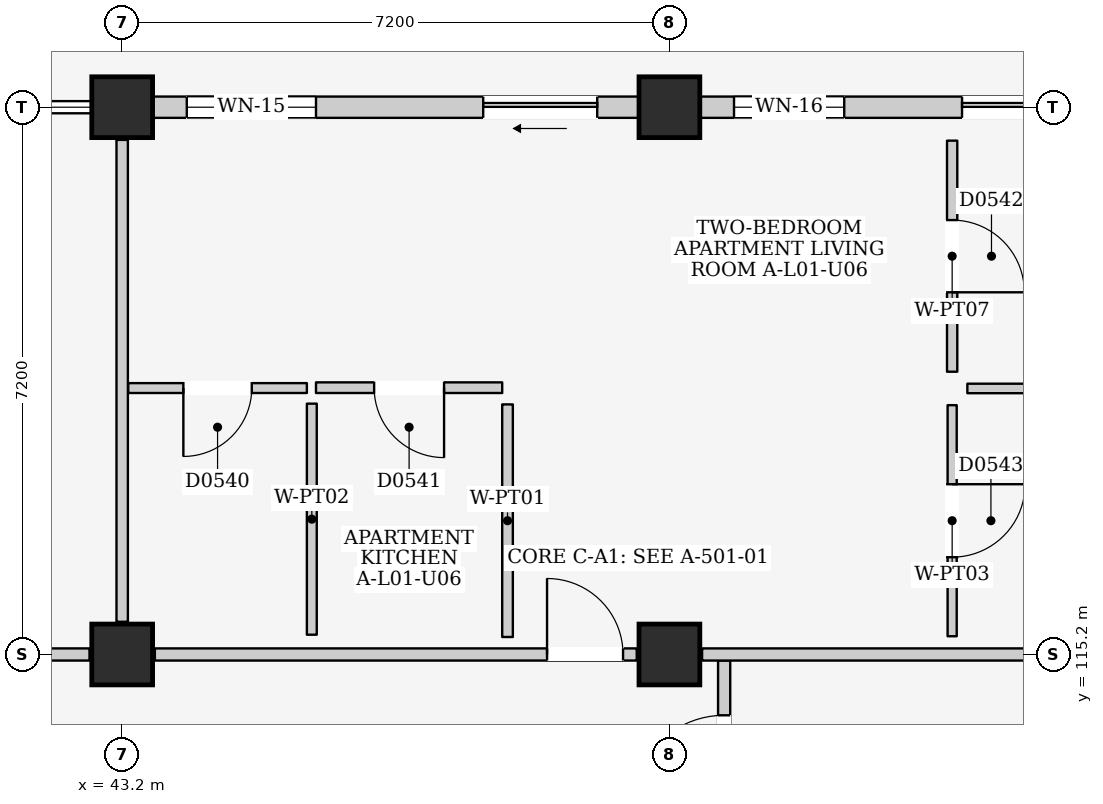
"""IFC4 building model, lengths in metres.
Left out: names, types, materials, properties, quantities, classifications, styles, units other than length and angle.
Written with IfcOpenShell. Run it as: python <this file> out.ifc"""

import sys

from ifc_helpers import new_model, si_unit, direction, frame, frame_2d, origin, origin_2d, place, context, subcontext, project, spatial, rectangle, extrude, element, fill, save


model = new_model("IFC4")
c1 = context("Model", 3, precision=1e-05, world=origin(), true_north=direction((0.0, 1.0)))
c2 = subcontext(c1, "Body", "Model", "MODEL_VIEW")
j1 = project(units=[si_unit("LENGTHUNIT", "METRE"), si_unit("PLANEANGLEUNIT", "RADIAN")], contexts=[c1])
p1 = place(None, origin())
s1 = spatial("IfcSite", under=j1, at=p1, CompositionType="ELEMENT")
p2 = place(p1, origin())
s2 = spatial("IfcBuilding", under=s1, at=p2, CompositionType="ELEMENT")
p3 = place(p2, frame((0.0, 0.0, 4.5)))
s3 = spatial("IfcBuildingStorey", under=s2, at=p3, CompositionType="ELEMENT", Elevation=4.5)
for number, where, z_axis, x_axis in (
    (1, (43.2, 115.2, 0.0), (0.0, 0.0, 1.0), (1.0, 0.0, 0.0)),
    (2, (43.2, 122.4, 0.0), (0.0, 0.0, 1.0), (1.0, 0.0, 0.0)),
    (3, (50.4, 115.2, 0.0), (0.0, 0.0, 1.0), (1.0, 0.0, 0.0)),
    (4, (50.4, 122.4, 0.0), (0.0, 0.0, 1.0), (1.0, 0.0, 0.0)),
):
    element("IfcColumn", number, at=place(p3, frame(where, z_axis=z_axis, x_axis=x_axis)), inside=s3, PredefinedType="COLUMN", context=c2, shape_type="SweptSolid", body=[
        extrude(rectangle(XDim=0.8, YDim=0.8, at=origin_2d()), origin(), (0.0, 0.0, 1.0), 4.5),
    ])
p4 = place(p3, frame((43.6, 122.4, 0.0), z_axis=(0.0, 0.0, 1.0), x_axis=(1.0, 0.0, 0.0)))
e5 = element("IfcWall", 5, at=p4, inside=s3, PredefinedType="ELEMENTEDWALL", context=c2, shape_type="SweptSolid", body=[
    extrude(rectangle(XDim=6.4, YDim=0.28, at=frame_2d((3.2, 0.0))), origin(), (0.0, 0.0, 1.0), 3.715),
])
p5 = place(p4, frame((4.35, 0.0, 0.0)))
e6 = element("IfcOpeningElement", 6, at=p5, cuts=e5, PredefinedType="OPENING", context=c2, shape_type="SweptSolid", body=[
    extrude(rectangle(XDim=1.5, YDim=2.12, at=frame_2d((0.75, 1.06))), frame((0.0, 0.155, 0.0), z_axis=(0.0, -1.0, 0.0), x_axis=(1.0, 0.0, 0.0)), (0.0, 0.0, 1.0), 0.31),
])
p6 = place(p4, frame((0.45, 0.0, 0.9)))
e7 = element("IfcOpeningElement", 7, at=p6, cuts=e5, PredefinedType="OPENING", context=c2, shape_type="SweptSolid", body=[
    extrude(rectangle(XDim=1.7, YDim=1.45, at=frame_2d((0.85, 0.725))), frame((0.0, 0.155, 0.0), z_axis=(0.0, -1.0, 0.0), x_axis=(1.0, 0.0, 0.0)), (0.0, 0.0, 1.0), 0.31),
])
p7 = place(p3, frame((50.8, 122.4, 0.0), z_axis=(0.0, 0.0, 1.0), x_axis=(1.0, 0.0, 0.0)))
e8 = element("IfcWall", 8, at=p7, inside=s3, PredefinedType="ELEMENTEDWALL", context=c2, shape_type="SweptSolid", body=[
    extrude(rectangle(XDim=6.4, YDim=0.28, at=frame_2d((3.2, 0.0))), origin(), (0.0, 0.0, 1.0), 3.715),
])
p8 = place(p7, frame((3.45, 0.0, 0.0)))
e9 = element("IfcOpeningElement", 9, at=p8, cuts=e8, PredefinedType="OPENING", context=c2, shape_type="SweptSolid", body=[
    extrude(rectangle(XDim=2.4, YDim=2.12, at=frame_2d((1.2, 1.06))), frame((0.0, 0.155, 0.0), z_axis=(0.0, -1.0, 0.0), x_axis=(1.0, 0.0, 0.0)), (0.0, 0.0, 1.0), 0.31),
])
p9 = place(p7, frame((0.45, 0.0, 0.9)))
e10 = element("IfcOpeningElement", 10, at=p9, cuts=e8, PredefinedType="OPENING", context=c2, shape_type="SweptSolid", body=[
    extrude(rectangle(XDim=1.45, YDim=1.4, at=frame_2d((0.725, 0.7))), frame((0.0, 0.155, 0.0), z_axis=(0.0, -1.0, 0.0), x_axis=(1.0, 0.0, 0.0)), (0.0, 0.0, 1.0), 0.31),
])
p10 = place(p3, frame((51.12, 111.1, 0.0), z_axis=(0.0, 0.0, 1.0), x_axis=(0.0, 1.0, 0.0)))
e11 = element("IfcWall", 11, at=p10, inside=s3, PredefinedType="PARTITIONING", context=c2, shape_type="SweptSolid", body=[
    extrude(rectangle(XDim=4.02, YDim=0.16, at=frame_2d((2.01, 0.0))), origin(), (0.0, 0.0, 1.0), 4.25),
])
p11 = place(p10, frame((2.1, 0.0, 0.0)))
e12 = element("IfcOpeningElement", 12, at=p11, cuts=e11, PredefinedType="OPENING", context=c2, shape_type="SweptSolid", body=[
    extrude(rectangle(XDim=1.2, YDim=2.2, at=frame_2d((0.6, 1.1))), frame((0.0, 0.095, 0.0), z_axis=(0.0, -1.0, 0.0), x_axis=(1.0, 0.0, 0.0)), (0.0, 0.0, 1.0), 0.19),
])
p12 = place(p3, frame((36.43, 115.2, 0.0), z_axis=(0.0, 0.0, 1.0), x_axis=(1.0, 0.0, 0.0)))
e13 = element("IfcWall", 13, at=p12, inside=s3, PredefinedType="PARTITIONING", context=c2, shape_type="SweptSolid", body=[
    extrude(rectangle(XDim=6.34, YDim=0.16, at=frame_2d((3.17, 0.0))), origin(), (0.0, 0.0, 1.0), 3.585),
])
p13 = place(p12, frame((2.67, 0.0, 0.0)))
e14 = element("IfcOpeningElement", 14, at=p13, cuts=e13, PredefinedType="OPENING", context=c2, shape_type="SweptSolid", body=[
    extrude(rectangle(XDim=1.0, YDim=2.15, at=frame_2d((0.5, 1.075))), frame((0.0, 0.095, 0.0), z_axis=(0.0, -1.0, 0.0), x_axis=(1.0, 0.0, 0.0)), (0.0, 0.0, 1.0), 0.19),
])
p14 = place(p3, frame((43.2, 115.63, 0.0), z_axis=(0.0, 0.0, 1.0), x_axis=(0.0, 1.0, 0.0)))
e15 = element("IfcWall", 15, at=p14, inside=s3, PredefinedType="PARTITIONING", context=c2, shape_type="SweptSolid", body=[
    extrude(rectangle(XDim=6.34, YDim=0.15, at=frame_2d((3.17, 0.0))), origin(), (0.0, 0.0, 1.0), 3.685),
])
p15 = place(p3, frame((43.63, 115.2, 0.0), z_axis=(0.0, 0.0, 1.0), x_axis=(1.0, 0.0, 0.0)))
e16 = element("IfcWall", 16, at=p15, inside=s3, PredefinedType="PARTITIONING", context=c2, shape_type="SweptSolid", body=[
    extrude(rectangle(XDim=6.34, YDim=0.16, at=frame_2d((3.17, 0.0))), origin(), (0.0, 0.0, 1.0), 3.585),
])
p16 = place(p15, frame((5.16, 0.0, 0.0)))
e17 = element("IfcOpeningElement", 17, at=p16, cuts=e16, PredefinedType="OPENING", context=c2, shape_type="SweptSolid", body=[
    extrude(rectangle(XDim=1.0, YDim=2.15, at=frame_2d((0.5, 1.075))), frame((0.0, 0.095, 0.0), z_axis=(0.0, -1.0, 0.0), x_axis=(1.0, 0.0, 0.0)), (0.0, 0.0, 1.0), 0.19),
])
p17 = place(p3, frame((50.83, 115.2, 0.0), z_axis=(0.0, 0.0, 1.0), x_axis=(1.0, 0.0, 0.0)))
e18 = element("IfcWall", 18, at=p17, inside=s3, PredefinedType="PARTITIONING", context=c2, shape_type="SweptSolid", body=[
    extrude(rectangle(XDim=6.34, YDim=0.16, at=frame_2d((3.17, 0.0))), origin(), (0.0, 0.0, 1.0), 3.585),
])
p18 = place(p3, frame((43.28, 118.705, 0.0), z_axis=(0.0, 0.0, 1.0), x_axis=(1.0, 0.0, 0.0)))
e19 = element("IfcWall", 19, at=p18, inside=s3, PredefinedType="PARTITIONING", context=c2, shape_type="SweptSolid", body=[
    extrude(rectangle(XDim=2.35, YDim=0.13, at=frame_2d((1.175, 0.0))), origin(), (0.0, 0.0, 1.0), 4.25),
])
p19 = place(p18, frame((0.725, 0.0, 0.0)))
e20 = element("IfcOpeningElement", 20, at=p19, cuts=e19, PredefinedType="OPENING", context=c2, shape_type="SweptSolid", body=[
    extrude(rectangle(XDim=0.9, YDim=2.1, at=frame_2d((0.45, 1.05))), frame((0.0, 0.08, 0.0), z_axis=(0.0, -1.0, 0.0), x_axis=(1.0, 0.0, 0.0)), (0.0, 0.0, 1.0), 0.16),
])
p20 = place(p3, frame((45.695, 115.46, 0.0), z_axis=(0.0, 0.0, 1.0), x_axis=(0.0, 1.0, 0.0)))
e21 = element("IfcWall", 21, at=p20, inside=s3, PredefinedType="PARTITIONING", context=c2, shape_type="SweptSolid", body=[
    extrude(rectangle(XDim=3.04, YDim=0.13, at=frame_2d((1.52, 0.0))), origin(), (0.0, 0.0, 1.0), 4.25),
])
p21 = place(p3, frame((45.75, 118.71, 0.0), z_axis=(0.0, 0.0, 1.0), x_axis=(1.0, 0.0, 0.0)))
e22 = element("IfcWall", 22, at=p21, inside=s3, PredefinedType="PARTITIONING", context=c2, shape_type="SweptSolid", body=[
    extrude(rectangle(XDim=2.45, YDim=0.14, at=frame_2d((1.225, 0.0))), origin(), (0.0, 0.0, 1.0), 4.25),
])
p22 = place(p21, frame((0.765, 0.0, 0.0)))
e23 = element("IfcOpeningElement", 23, at=p22, cuts=e22, PredefinedType="OPENING", context=c2, shape_type="SweptSolid", body=[
    extrude(rectangle(XDim=0.92, YDim=2.1, at=frame_2d((0.46, 1.05))), frame((0.0, 0.085, 0.0), z_axis=(0.0, -1.0, 0.0), x_axis=(1.0, 0.0, 0.0)), (0.0, 0.0, 1.0), 0.17),
])
p23 = place(p3, frame((48.27, 115.43, 0.0), z_axis=(0.0, 0.0, 1.0), x_axis=(0.0, 1.0, 0.0)))
e24 = element("IfcWall", 24, at=p23, inside=s3, PredefinedType="PARTITIONING", context=c2, shape_type="SweptSolid", body=[
    extrude(rectangle(XDim=3.06, YDim=0.14, at=frame_2d((1.53, 0.0))), origin(), (0.0, 0.0, 1.0), 4.25),
])
p24 = place(p3, frame((54.12, 118.92, 0.0), z_axis=(0.0, 0.0, 1.0), x_axis=(0.0, 1.0, 0.0)))
e25 = element("IfcWall", 25, at=p24, inside=s3, PredefinedType="PARTITIONING", context=c2, shape_type="SweptSolid", body=[
    extrude(rectangle(XDim=3.04, YDim=0.135, at=frame_2d((1.52, 0.0))), origin(), (0.0, 0.0, 1.0), 4.25),
])
p25 = place(p24, frame((1.045, 0.0, 0.0)))
e26 = element("IfcOpeningElement", 26, at=p25, cuts=e25, PredefinedType="OPENING", context=c2, shape_type="SweptSolid", body=[
    extrude(rectangle(XDim=0.95, YDim=2.15, at=frame_2d((0.475, 1.075))), frame((0.0, 0.083, 0.0), z_axis=(0.0, -1.0, 0.0), x_axis=(1.0, 0.0, 0.0)), (0.0, 0.0, 1.0), 0.165),
])
p26 = place(p3, frame((54.32, 118.7, 0.0), z_axis=(0.0, 0.0, 1.0), x_axis=(1.0, 0.0, 0.0)))
e27 = element("IfcWall", 27, at=p26, inside=s3, PredefinedType="PARTITIONING", context=c2, shape_type="SweptSolid", body=[
    extrude(rectangle(XDim=3.06, YDim=0.125, at=frame_2d((1.53, 0.0))), origin(), (0.0, 0.0, 1.0), 4.25),
])
p27 = place(p3, frame((54.12, 115.44, 0.0), z_axis=(0.0, 0.0, 1.0), x_axis=(0.0, 1.0, 0.0)))
e28 = element("IfcWall", 28, at=p27, inside=s3, PredefinedType="PARTITIONING", context=c2, shape_type="SweptSolid", body=[
    extrude(rectangle(XDim=3.04, YDim=0.12, at=frame_2d((1.52, 0.0))), origin(), (0.0, 0.0, 1.0), 4.25),
])
p28 = place(p27, frame((1.04, 0.0, 0.0)))
e29 = element("IfcOpeningElement", 29, at=p28, cuts=e28, PredefinedType="OPENING", context=c2, shape_type="SweptSolid", body=[
    extrude(rectangle(XDim=0.96, YDim=2.15, at=frame_2d((0.48, 1.075))), frame((0.0, 0.075, 0.0), z_axis=(0.0, -1.0, 0.0), x_axis=(1.0, 0.0, 0.0)), (0.0, 0.0, 1.0), 0.15),
])
p29 = place(p5, frame((1.5, 0.0, 0.0), z_axis=(0.0, 0.0, 1.0), x_axis=(-1.0, 0.0, 0.0)))
e30 = element("IfcDoor", 30, at=p29, inside=s3, OperationType="SLIDING_TO_LEFT", PredefinedType="DOOR", context=c2, shape_type="SweptSolid", body=[
    extrude(rectangle(XDim=1.5, YDim=2.12, at=frame_2d((0.75, 1.06))), frame((0.0, 0.025, 0.0), z_axis=(0.0, -1.0, 0.0), x_axis=(1.0, 0.0, 0.0)), (0.0, 0.0, 1.0), 0.05),
])
fill(e6, e30)
p30 = place(p6, origin())
e31 = element("IfcWindow", 31, at=p30, inside=s3, PartitioningType="DOUBLE_PANEL_VERTICAL", PredefinedType="WINDOW", context=c2, shape_type="SweptSolid", body=[
    extrude(rectangle(XDim=1.7, YDim=1.45, at=frame_2d((0.85, 0.725))), frame((0.0, 0.03, 0.0), z_axis=(0.0, -1.0, 0.0), x_axis=(1.0, 0.0, 0.0)), (0.0, 0.0, 1.0), 0.06),
])
fill(e7, e31)
p31 = place(p8, frame((2.4, 0.0, 0.0), z_axis=(0.0, 0.0, 1.0), x_axis=(-1.0, 0.0, 0.0)))
e32 = element("IfcDoor", 32, at=p31, inside=s3, OperationType="DOUBLE_DOOR_SLIDING", PredefinedType="DOOR", context=c2, shape_type="SweptSolid", body=[
    extrude(rectangle(XDim=2.4, YDim=2.12, at=frame_2d((1.2, 1.06))), frame((0.0, 0.025, 0.0), z_axis=(0.0, -1.0, 0.0), x_axis=(1.0, 0.0, 0.0)), (0.0, 0.0, 1.0), 0.05),
])
fill(e9, e32)
p32 = place(p9, origin())
e33 = element("IfcWindow", 33, at=p32, inside=s3, PartitioningType="DOUBLE_PANEL_VERTICAL", PredefinedType="WINDOW", context=c2, shape_type="SweptSolid", body=[
    extrude(rectangle(XDim=1.45, YDim=1.4, at=frame_2d((0.725, 0.7))), frame((0.0, 0.03, 0.0), z_axis=(0.0, -1.0, 0.0), x_axis=(1.0, 0.0, 0.0)), (0.0, 0.0, 1.0), 0.06),
])
fill(e10, e33)
p33 = place(p11, origin())
e34 = element("IfcDoor", 34, at=p33, inside=s3, OperationType="SINGLE_SWING_LEFT", PredefinedType="DOOR", context=c2, shape_type="SweptSolid", body=[
    extrude(rectangle(XDim=1.2, YDim=2.2, at=frame_2d((0.6, 1.1))), frame((0.0, 0.025, 0.0), z_axis=(0.0, -1.0, 0.0), x_axis=(1.0, 0.0, 0.0)), (0.0, 0.0, 1.0), 0.05),
])
fill(e12, e34)
p34 = place(p16, origin())
e35 = element("IfcDoor", 35, at=p34, inside=s3, OperationType="SINGLE_SWING_LEFT", PredefinedType="DOOR", context=c2, shape_type="SweptSolid", body=[
    extrude(rectangle(XDim=1.0, YDim=2.15, at=frame_2d((0.5, 1.075))), frame((0.0, 0.025, 0.0), z_axis=(0.0, -1.0, 0.0), x_axis=(1.0, 0.0, 0.0)), (0.0, 0.0, 1.0), 0.05),
])
fill(e17, e35)
p35 = place(p19, frame((0.9, 0.0, 0.0), z_axis=(0.0, 0.0, 1.0), x_axis=(-1.0, 0.0, 0.0)))
e36 = element("IfcDoor", 36, at=p35, inside=s3, OperationType="SINGLE_SWING_RIGHT", PredefinedType="DOOR", context=c2, shape_type="SweptSolid", body=[
    extrude(rectangle(XDim=0.9, YDim=2.1, at=frame_2d((0.45, 1.05))), frame((0.0, 0.025, 0.0), z_axis=(0.0, -1.0, 0.0), x_axis=(1.0, 0.0, 0.0)), (0.0, 0.0, 1.0), 0.05),
])
fill(e20, e36)
p36 = place(p22, frame((0.92, 0.0, 0.0), z_axis=(0.0, 0.0, 1.0), x_axis=(-1.0, 0.0, 0.0)))
e37 = element("IfcDoor", 37, at=p36, inside=s3, OperationType="SINGLE_SWING_LEFT", PredefinedType="DOOR", context=c2, shape_type="SweptSolid", body=[
    extrude(rectangle(XDim=0.92, YDim=2.1, at=frame_2d((0.46, 1.05))), frame((0.0, 0.025, 0.0), z_axis=(0.0, -1.0, 0.0), x_axis=(1.0, 0.0, 0.0)), (0.0, 0.0, 1.0), 0.05),
])
fill(e23, e37)
p37 = place(p25, frame((0.95, 0.0, 0.0), z_axis=(0.0, 0.0, 1.0), x_axis=(-1.0, 0.0, 0.0)))
e38 = element("IfcDoor", 38, at=p37, inside=s3, OperationType="SINGLE_SWING_RIGHT", PredefinedType="DOOR", context=c2, shape_type="SweptSolid", body=[
    extrude(rectangle(XDim=0.95, YDim=2.15, at=frame_2d((0.475, 1.075))), frame((0.0, 0.025, 0.0), z_axis=(0.0, -1.0, 0.0), x_axis=(1.0, 0.0, 0.0)), (0.0, 0.0, 1.0), 0.05),
])
fill(e26, e38)
p38 = place(p28, frame((0.96, 0.0, 0.0), z_axis=(0.0, 0.0, 1.0), x_axis=(-1.0, 0.0, 0.0)))
e39 = element("IfcDoor", 39, at=p38, inside=s3, OperationType="SINGLE_SWING_LEFT", PredefinedType="DOOR", context=c2, shape_type="SweptSolid", body=[
    extrude(rectangle(XDim=0.96, YDim=2.15, at=frame_2d((0.48, 1.075))), frame((0.0, 0.025, 0.0), z_axis=(0.0, -1.0, 0.0), x_axis=(1.0, 0.0, 0.0)), (0.0, 0.0, 1.0), 0.05),
])
fill(e29, e39)
save(model, sys.argv[1])
